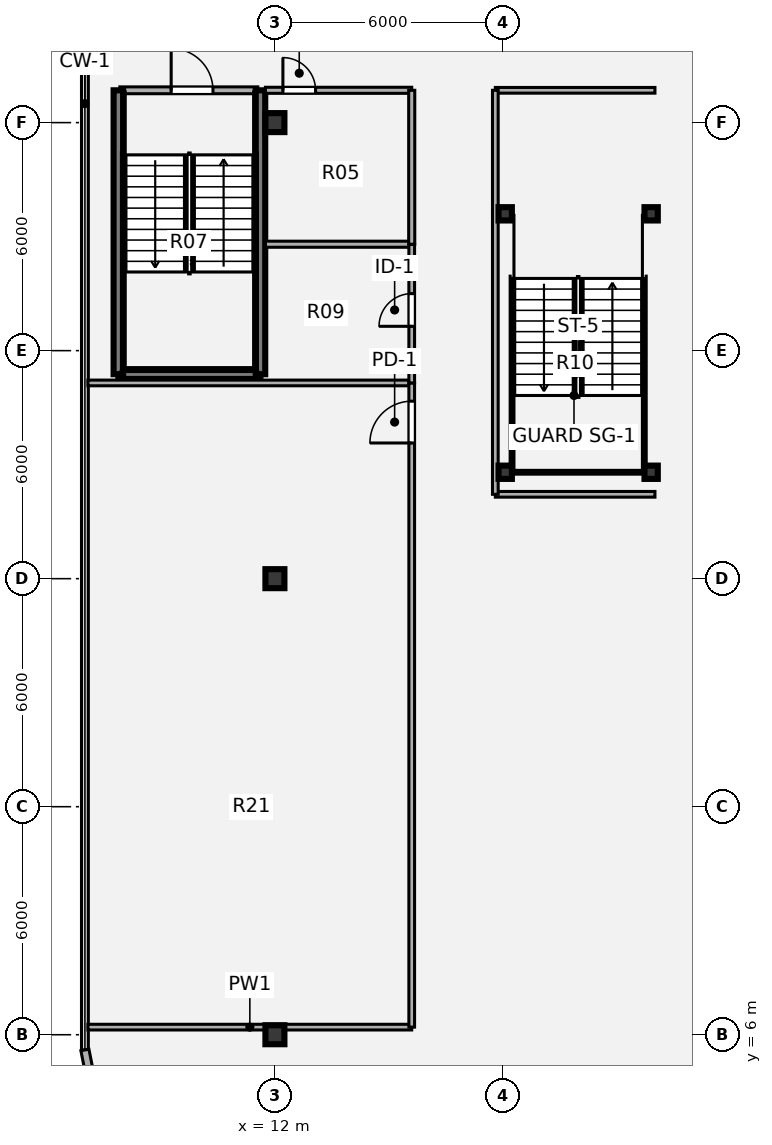
"""IFC4 building model, lengths in metres.
Left out: names, types, materials, properties, quantities, classifications, styles, units other than length and angle.
Written with IfcOpenShell. Run it as: python <this file> out.ifc"""

import sys

from ifc_helpers import new_model, si_unit, direction, frame, frame_2d, origin, origin_2d, place, context, subcontext, project, spatial, rectangle, hollow_rectangle, i_section, extrude, source, transform, mapped, element, fill, save


model = new_model("IFC4")
c1 = context("Model", 3, precision=1e-05, world=origin(), true_north=direction((0.0, 1.0)))
c2 = subcontext(c1, "Body", "Model", "MODEL_VIEW")
j1 = project(units=[si_unit("LENGTHUNIT", "METRE"), si_unit("PLANEANGLEUNIT", "RADIAN")], contexts=[c1])
p1 = place(None, origin())
s1 = spatial("IfcSite", under=j1, at=p1, CompositionType="ELEMENT")
p2 = place(p1, origin())
s2 = spatial("IfcBuilding", under=s1, at=p2, CompositionType="ELEMENT")
p3 = place(p2, frame((0.0, 0.0, 18.36)))
s3 = spatial("IfcBuildingStorey", under=s2, at=p3, CompositionType="ELEMENT", Elevation=18.36)
m1 = source(origin(), c2, "Body", "SweptSolid", [
    extrude(i_section(OverallWidth=0.5, OverallDepth=0.5, WebThickness=0.022, FlangeThickness=0.035, at=origin_2d()), origin(), (0.0, 0.0, 1.0), 4.32),
])
for number, where, z_axis, x_axis in (
    (1, (12.0, 6.0, 0.0), (0.0, 0.0, 1.0), (1.0, 0.0, 0.0)),
    (2, (12.0, 18.0, 0.0), (0.0, 0.0, 1.0), (1.0, 0.0, 0.0)),
    (3, (12.0, 30.0, 0.0), (0.0, 0.0, 1.0), (1.0, 0.0, 0.0)),
):
    element("IfcColumn", number, at=place(p3, frame(where, z_axis=z_axis, x_axis=x_axis)), inside=s3, PredefinedType="COLUMN", context=c2, shape_type="MappedRepresentation", body=[
        mapped(m1, transform((0.0, 0.0, 0.0), x_axis=(1.0, 0.0, 0.0), y_axis=(0.0, 1.0, 0.0), z_axis=(0.0, 0.0, 1.0), scale=1.0)),
    ])
m2 = source(origin(), c2, "Body", "SweptSolid", [
    extrude(hollow_rectangle(XDim=0.35, YDim=0.35, WallThickness=0.016, OuterFilletRadius=0.032, at=origin_2d()), origin(), (0.0, 0.0, 1.0), 4.32),
])
for number, where, z_axis, x_axis in (
    (4, (18.06, 20.8, 0.0), (0.0, 0.0, 1.0), (1.0, 0.0, 0.0)),
    (5, (21.9, 20.8, 0.0), (0.0, 0.0, 1.0), (1.0, 0.0, 0.0)),
    (6, (18.06, 27.6, 0.0), (0.0, 0.0, 1.0), (1.0, 0.0, 0.0)),
    (7, (21.9, 27.6, 0.0), (0.0, 0.0, 1.0), (1.0, 0.0, 0.0)),
):
    element("IfcColumn", number, at=place(p3, frame(where, z_axis=z_axis, x_axis=x_axis)), inside=s3, PredefinedType="COLUMN", context=c2, shape_type="MappedRepresentation", body=[
        mapped(m2, transform((0.0, 0.0, 0.0), x_axis=(1.0, 0.0, 0.0), y_axis=(0.0, 1.0, 0.0), z_axis=(0.0, 0.0, 1.0), scale=1.0)),
    ])
p4 = place(p3, frame((7.244, 4.375, 0.0), z_axis=(0.0, 0.0, 1.0), x_axis=(-0.195138390419, 0.980775717779, 0.0)))
e8 = element("IfcWall", 8, at=p4, inside=s3, PredefinedType="SOLIDWALL", context=c2, shape_type="SweptSolid", body=[
    extrude(rectangle(XDim=1.249, YDim=0.215, at=frame_2d((0.624, 0.0))), origin(), (0.0, 0.0, 1.0), 4.04),
])
p5 = place(p3, frame((7.92, 30.85, 0.0), z_axis=(0.0, 0.0, 1.0), x_axis=(1.0, 0.0, 0.0)))
e9 = element("IfcWall", 9, at=p5, inside=s3, PredefinedType="PARTITIONING", context=c2, shape_type="SweptSolid", body=[
    extrude(rectangle(XDim=3.63, YDim=0.18, at=frame_2d((1.815, 0.0))), origin(), (0.0, 0.0, 1.0), 4.04),
])
p6 = place(p5, frame((1.35, 0.0, 0.0)))
e10 = element("IfcOpeningElement", 10, at=p6, cuts=e9, PredefinedType="OPENING", context=c2, shape_type="SweptSolid", body=[
    extrude(rectangle(XDim=1.1, YDim=2.1, at=origin_2d()), frame((0.55, 0.1, 1.05), z_axis=(0.0, -1.0, 0.0), x_axis=(1.0, 0.0, 0.0)), (0.0, 0.0, 1.0), 0.2),
])
p7 = place(p3, frame((7.88, 23.38, 0.0), z_axis=(0.0, 0.0, 1.0), x_axis=(1.0, 0.0, 0.0)))
e11 = element("IfcWall", 11, at=p7, inside=s3, PredefinedType="SHEAR", context=c2, shape_type="SweptSolid", body=[
    extrude(rectangle(XDim=3.74, YDim=0.25, at=frame_2d((1.87, 0.0))), origin(), (0.0, 0.0, 1.0), 4.32),
])
for number, where, z_axis, x_axis in (
    (12, (7.88, 23.38, 0.0), (0.0, 0.0, 1.0), (0.0, 1.0, 0.0)),
    (13, (11.62, 23.38, 0.0), (0.0, 0.0, 1.0), (0.0, 1.0, 0.0)),
):
    element("IfcWall", number, at=place(p3, frame(where, z_axis=z_axis, x_axis=x_axis)), inside=s3, PredefinedType="SHEAR", context=c2, shape_type="SweptSolid", body=[
        extrude(rectangle(XDim=7.47, YDim=0.25, at=frame_2d((3.735, 0.0))), origin(), (0.0, 0.0, 1.0), 4.32),
    ])
p8 = place(p3, frame((7.08, 6.2, 0.0), z_axis=(0.0, 0.0, 1.0), x_axis=(1.0, 0.0, 0.0)))
e14 = element("IfcWall", 14, at=p8, inside=s3, PredefinedType="PARTITIONING", context=c2, shape_type="SweptSolid", body=[
    extrude(rectangle(XDim=8.52, YDim=0.15, at=frame_2d((4.26, 0.0))), origin(), (0.0, 0.0, 1.0), 2.225),
])
p9 = place(p3, frame((17.8, 20.22, 0.0), z_axis=(0.0, 0.0, 1.0), x_axis=(1.0, 0.0, 0.0)))
e15 = element("IfcWall", 15, at=p9, inside=s3, PredefinedType="PARTITIONING", context=c2, shape_type="SweptSolid", body=[
    extrude(rectangle(XDim=4.2, YDim=0.15, at=frame_2d((2.1, 0.0))), origin(), (0.0, 0.0, 1.0), 2.225),
])
p10 = place(p3, frame((7.08, 23.15, 0.0), z_axis=(0.0, 0.0, 1.0), x_axis=(1.0, 0.0, 0.0)))
e16 = element("IfcWall", 16, at=p10, inside=s3, PredefinedType="PARTITIONING", context=c2, shape_type="SweptSolid", body=[
    extrude(rectangle(XDim=8.52, YDim=0.15, at=frame_2d((4.26, 0.0))), origin(), (0.0, 0.0, 1.0), 4.01),
])
p11 = place(p3, frame((11.75, 26.8, 0.0), z_axis=(0.0, 0.0, 1.0), x_axis=(1.0, 0.0, 0.0)))
e17 = element("IfcWall", 17, at=p11, inside=s3, PredefinedType="PLUMBINGWALL", context=c2, shape_type="SweptSolid", body=[
    extrude(rectangle(XDim=3.85, YDim=0.16, at=frame_2d((1.925, 0.0))), origin(), (0.0, 0.0, 1.0), 4.01),
])
p12 = place(p3, frame((11.75, 30.85, 0.0), z_axis=(0.0, 0.0, 1.0), x_axis=(1.0, 0.0, 0.0)))
e18 = element("IfcWall", 18, at=p12, inside=s3, PredefinedType="PLUMBINGWALL", context=c2, shape_type="SweptSolid", body=[
    extrude(rectangle(XDim=3.85, YDim=0.16, at=frame_2d((1.925, 0.0))), origin(), (0.0, 0.0, 1.0), 4.01),
])
p13 = place(p12, frame((0.46, 0.0, 0.0)))
e19 = element("IfcOpeningElement", 19, at=p13, cuts=e18, PredefinedType="OPENING", context=c2, shape_type="SweptSolid", body=[
    extrude(rectangle(XDim=0.86, YDim=2.1, at=origin_2d()), frame((0.43, 0.09, 1.05), z_axis=(0.0, -1.0, 0.0), x_axis=(1.0, 0.0, 0.0)), (0.0, 0.0, 1.0), 0.18),
])
p14 = place(p3, frame((17.8, 30.85, 0.0), z_axis=(0.0, 0.0, 1.0), x_axis=(1.0, 0.0, 0.0)))
e20 = element("IfcWall", 20, at=p14, inside=s3, PredefinedType="PARTITIONING", context=c2, shape_type="SweptSolid", body=[
    extrude(rectangle(XDim=4.2, YDim=0.15, at=frame_2d((2.1, 0.0))), origin(), (0.0, 0.0, 1.0), 4.01),
])
p15 = place(p3, frame((15.6, 6.2, 0.0), z_axis=(0.0, 0.0, 1.0), x_axis=(0.0, 1.0, 0.0)))
e21 = element("IfcWall", 21, at=p15, inside=s3, PredefinedType="PARTITIONING", context=c2, shape_type="SweptSolid", body=[
    extrude(rectangle(XDim=16.95, YDim=0.15, at=frame_2d((8.475, 0.0))), origin(), (0.0, 0.0, 1.0), 3.666),
])
p16 = place(p15, frame((15.37, 0.0, 0.0)))
e22 = element("IfcOpeningElement", 22, at=p16, cuts=e21, PredefinedType="OPENING", context=c2, shape_type="SweptSolid", body=[
    extrude(rectangle(XDim=1.1, YDim=2.1, at=origin_2d()), frame((0.55, 0.085, 1.05), z_axis=(0.0, -1.0, 0.0), x_axis=(1.0, 0.0, 0.0)), (0.0, 0.0, 1.0), 0.17),
])
p17 = place(p3, frame((15.6, 23.15, 0.0), z_axis=(0.0, 0.0, 1.0), x_axis=(0.0, 1.0, 0.0)))
e23 = element("IfcWall", 23, at=p17, inside=s3, PredefinedType="PARTITIONING", context=c2, shape_type="SweptSolid", body=[
    extrude(rectangle(XDim=3.65, YDim=0.15, at=frame_2d((1.825, 0.0))), origin(), (0.0, 0.0, 1.0), 3.666),
])
p18 = place(p17, frame((1.49, 0.0, 0.0)))
e24 = element("IfcOpeningElement", 24, at=p18, cuts=e23, PredefinedType="OPENING", context=c2, shape_type="SweptSolid", body=[
    extrude(rectangle(XDim=0.86, YDim=2.1, at=origin_2d()), frame((0.43, 0.085, 1.05), z_axis=(0.0, -1.0, 0.0), x_axis=(1.0, 0.0, 0.0)), (0.0, 0.0, 1.0), 0.17),
])
p19 = place(p3, frame((15.6, 26.8, 0.0), z_axis=(0.0, 0.0, 1.0), x_axis=(0.0, 1.0, 0.0)))
e25 = element("IfcWall", 25, at=p19, inside=s3, PredefinedType="PLUMBINGWALL", context=c2, shape_type="SweptSolid", body=[
    extrude(rectangle(XDim=4.05, YDim=0.16, at=frame_2d((2.025, 0.0))), origin(), (0.0, 0.0, 1.0), 3.666),
])
p20 = place(p3, frame((17.8, 20.22, 0.0), z_axis=(0.0, 0.0, 1.0), x_axis=(0.0, 1.0, 0.0)))
e26 = element("IfcWall", 26, at=p20, inside=s3, PredefinedType="PARTITIONING", context=c2, shape_type="SweptSolid", body=[
    extrude(rectangle(XDim=10.63, YDim=0.15, at=frame_2d((5.315, 0.0))), origin(), (0.0, 0.0, 1.0), 3.666),
])
m3 = source(origin(), c2, "Body", "SweptSolid", [
    extrude(rectangle(XDim=1.1, YDim=2.1, at=origin_2d()), frame((0.55, 0.025, 1.05), z_axis=(0.0, -1.0, 0.0), x_axis=(1.0, 0.0, 0.0)), (0.0, 0.0, 1.0), 0.05),
])
p21 = place(p6, origin())
e27 = element("IfcDoor", 27, at=p21, inside=s3, OperationType="SINGLE_SWING_LEFT", PredefinedType="DOOR", context=c2, shape_type="MappedRepresentation", body=[
    mapped(m3, transform((0.0, 0.0, 0.0), x_axis=(1.0, 0.0, 0.0), y_axis=(0.0, 1.0, 0.0), z_axis=(0.0, 0.0, 1.0), scale=1.0)),
])
fill(e10, e27)
m4 = source(origin(), c2, "Body", "SweptSolid", [
    extrude(rectangle(XDim=0.86, YDim=2.1, at=origin_2d()), frame((0.43, 0.025, 1.05), z_axis=(0.0, -1.0, 0.0), x_axis=(1.0, 0.0, 0.0)), (0.0, 0.0, 1.0), 0.05),
])
p22 = place(p13, origin())
e28 = element("IfcDoor", 28, at=p22, inside=s3, OperationType="SINGLE_SWING_LEFT", PredefinedType="DOOR", context=c2, shape_type="MappedRepresentation", body=[
    mapped(m4, transform((0.0, 0.0, 0.0), x_axis=(1.0, 0.0, 0.0), y_axis=(0.0, 1.0, 0.0), z_axis=(0.0, 0.0, 1.0), scale=1.0)),
])
fill(e19, e28)
m5 = source(origin(), c2, "Body", "SweptSolid", [
    extrude(rectangle(XDim=1.1, YDim=2.1, at=origin_2d()), frame((0.55, 0.025, 1.05), z_axis=(0.0, -1.0, 0.0), x_axis=(1.0, 0.0, 0.0)), (0.0, 0.0, 1.0), 0.05),
])
p23 = place(p16, origin())
e29 = element("IfcDoor", 29, at=p23, inside=s3, OperationType="SINGLE_SWING_LEFT", PredefinedType="DOOR", context=c2, shape_type="MappedRepresentation", body=[
    mapped(m5, transform((0.0, 0.0, 0.0), x_axis=(1.0, 0.0, 0.0), y_axis=(0.0, 1.0, 0.0), z_axis=(0.0, 0.0, 1.0), scale=1.0)),
])
fill(e22, e29)
m6 = source(origin(), c2, "Body", "SweptSolid", [
    extrude(rectangle(XDim=0.86, YDim=2.1, at=origin_2d()), frame((0.43, 0.025, 1.05), z_axis=(0.0, -1.0, 0.0), x_axis=(1.0, 0.0, 0.0)), (0.0, 0.0, 1.0), 0.05),
])
p24 = place(p18, origin())
e30 = element("IfcDoor", 30, at=p24, inside=s3, OperationType="SINGLE_SWING_LEFT", PredefinedType="DOOR", context=c2, shape_type="MappedRepresentation", body=[
    mapped(m6, transform((0.0, 0.0, 0.0), x_axis=(1.0, 0.0, 0.0), y_axis=(0.0, 1.0, 0.0), z_axis=(0.0, 0.0, 1.0), scale=1.0)),
])
fill(e24, e30)
save(model, sys.argv[1])
